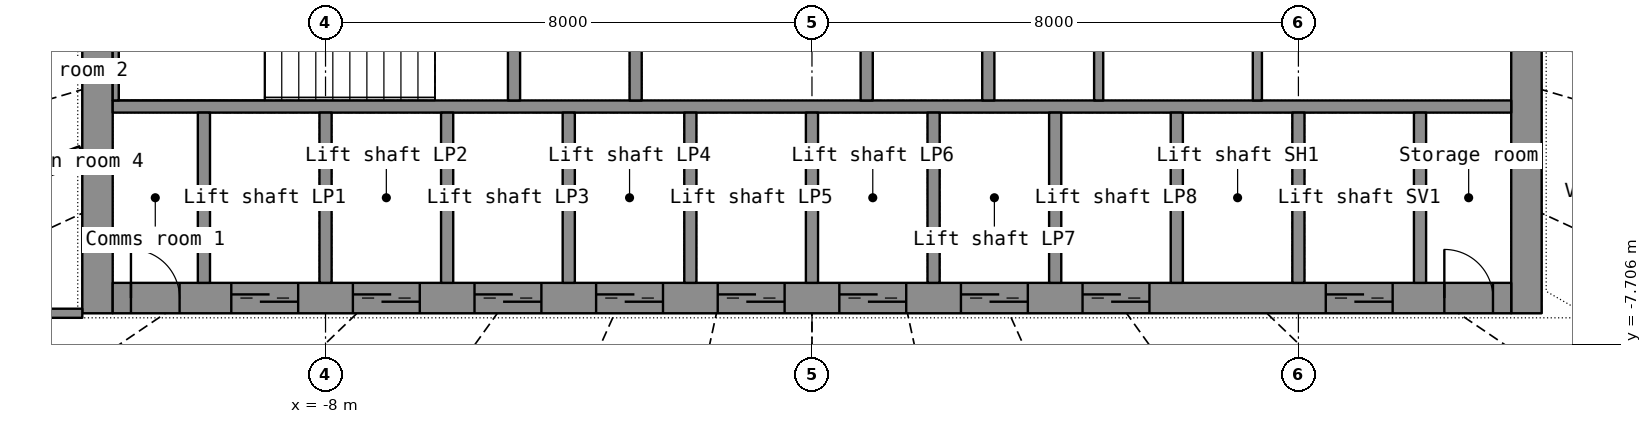
"""IFC4 building model, lengths in metres.
Left out: names, types, materials, properties, quantities, classifications, styles, units other than length and angle.
Written with IfcOpenShell. Run it as: python <this file> out.ifc"""

import sys

from ifc_helpers import new_model, si_unit, direction, frame, frame_2d, origin, place, context, subcontext, project, spatial, rectangle, extrude, element, fill, save


model = new_model("IFC4")
c1 = context("Model", 3, precision=1e-05, world=origin(), true_north=direction((0.0, 1.0)))
c2 = subcontext(c1, "Body", "Model", "MODEL_VIEW")
j1 = project(units=[si_unit("LENGTHUNIT", "METRE"), si_unit("PLANEANGLEUNIT", "RADIAN")], contexts=[c1])
p1 = place(None, origin())
s1 = spatial("IfcSite", under=j1, at=p1, CompositionType="ELEMENT")
p2 = place(p1, origin())
s2 = spatial("IfcBuilding", under=s1, at=p2, CompositionType="ELEMENT")
p3 = place(p2, frame((0.0, 0.0, 130.4)))
s3 = spatial("IfcBuildingStorey", under=s2, at=p3, CompositionType="ELEMENT", Elevation=130.4)
p4 = place(p3, frame((-11.75, -7.2, 0.0), z_axis=(0.0, 0.0, 1.0), x_axis=(0.0, 1.0, 0.0)))
e1 = element("IfcWall", 1, at=p4, inside=s3, PredefinedType="SHEAR", context=c2, shape_type="SweptSolid", body=[
    extrude(rectangle(XDim=14.4, YDim=0.5, at=frame_2d((7.2, 0.0))), origin(), (0.0, 0.0, 1.0), 3.3),
])
p5 = place(p4, frame((6.5, 0.0, 0.0)))
e2 = element("IfcOpeningElement", 2, at=p5, cuts=e1, PredefinedType="OPENING", context=c2, shape_type="SweptSolid", body=[
    extrude(rectangle(XDim=1.4, YDim=2.2, at=frame_2d((0.7, 1.1))), frame((0.0, 0.26, 0.0), z_axis=(0.0, -1.0, 0.0), x_axis=(1.0, 0.0, 0.0)), (0.0, 0.0, 1.0), 0.52),
])
p6 = place(p3, frame((11.75, -7.2, 0.0), z_axis=(0.0, 0.0, 1.0), x_axis=(0.0, 1.0, 0.0)))
e3 = element("IfcWall", 3, at=p6, inside=s3, PredefinedType="SHEAR", context=c2, shape_type="SweptSolid", body=[
    extrude(rectangle(XDim=14.4, YDim=0.5, at=frame_2d((7.2, 0.0))), origin(), (0.0, 0.0, 1.0), 3.3),
])
p7 = place(p6, frame((6.5, 0.0, 0.0)))
e4 = element("IfcOpeningElement", 4, at=p7, cuts=e3, PredefinedType="OPENING", context=c2, shape_type="SweptSolid", body=[
    extrude(rectangle(XDim=1.4, YDim=2.2, at=frame_2d((0.7, 1.1))), frame((0.0, 0.26, 0.0), z_axis=(0.0, -1.0, 0.0), x_axis=(1.0, 0.0, 0.0)), (0.0, 0.0, 1.0), 0.52),
])
p8 = place(p3, frame((-11.5, -6.95, 0.0), z_axis=(0.0, 0.0, 1.0), x_axis=(1.0, 0.0, 0.0)))
e5 = element("IfcWall", 5, at=p8, inside=s3, PredefinedType="SHEAR", context=c2, shape_type="SweptSolid", body=[
    extrude(rectangle(XDim=23.0, YDim=0.5, at=frame_2d((11.5, 0.0))), origin(), (0.0, 0.0, 1.0), 3.3),
])
p9 = place(p8, frame((1.95, 0.0, 0.0)))
e6 = element("IfcOpeningElement", 6, at=p9, cuts=e5, PredefinedType="OPENING", context=c2, shape_type="SweptSolid", body=[
    extrude(rectangle(XDim=1.1, YDim=2.2, at=frame_2d((0.55, 1.1))), frame((0.0, 0.26, 0.0), z_axis=(0.0, -1.0, 0.0), x_axis=(1.0, 0.0, 0.0)), (0.0, 0.0, 1.0), 0.52),
])
p10 = place(p8, frame((3.95, 0.0, 0.0)))
e7 = element("IfcOpeningElement", 7, at=p10, cuts=e5, PredefinedType="OPENING", context=c2, shape_type="SweptSolid", body=[
    extrude(rectangle(XDim=1.1, YDim=2.2, at=frame_2d((0.55, 1.1))), frame((0.0, 0.26, 0.0), z_axis=(0.0, -1.0, 0.0), x_axis=(1.0, 0.0, 0.0)), (0.0, 0.0, 1.0), 0.52),
])
p11 = place(p8, frame((5.95, 0.0, 0.0)))
e8 = element("IfcOpeningElement", 8, at=p11, cuts=e5, PredefinedType="OPENING", context=c2, shape_type="SweptSolid", body=[
    extrude(rectangle(XDim=1.1, YDim=2.2, at=frame_2d((0.55, 1.1))), frame((0.0, 0.26, 0.0), z_axis=(0.0, -1.0, 0.0), x_axis=(1.0, 0.0, 0.0)), (0.0, 0.0, 1.0), 0.52),
])
p12 = place(p8, frame((7.95, 0.0, 0.0)))
e9 = element("IfcOpeningElement", 9, at=p12, cuts=e5, PredefinedType="OPENING", context=c2, shape_type="SweptSolid", body=[
    extrude(rectangle(XDim=1.1, YDim=2.2, at=frame_2d((0.55, 1.1))), frame((0.0, 0.26, 0.0), z_axis=(0.0, -1.0, 0.0), x_axis=(1.0, 0.0, 0.0)), (0.0, 0.0, 1.0), 0.52),
])
p13 = place(p8, frame((9.95, 0.0, 0.0)))
e10 = element("IfcOpeningElement", 10, at=p13, cuts=e5, PredefinedType="OPENING", context=c2, shape_type="SweptSolid", body=[
    extrude(rectangle(XDim=1.1, YDim=2.2, at=frame_2d((0.55, 1.1))), frame((0.0, 0.26, 0.0), z_axis=(0.0, -1.0, 0.0), x_axis=(1.0, 0.0, 0.0)), (0.0, 0.0, 1.0), 0.52),
])
p14 = place(p8, frame((11.95, 0.0, 0.0)))
e11 = element("IfcOpeningElement", 11, at=p14, cuts=e5, PredefinedType="OPENING", context=c2, shape_type="SweptSolid", body=[
    extrude(rectangle(XDim=1.1, YDim=2.2, at=frame_2d((0.55, 1.1))), frame((0.0, 0.26, 0.0), z_axis=(0.0, -1.0, 0.0), x_axis=(1.0, 0.0, 0.0)), (0.0, 0.0, 1.0), 0.52),
])
p15 = place(p8, frame((13.95, 0.0, 0.0)))
e12 = element("IfcOpeningElement", 12, at=p15, cuts=e5, PredefinedType="OPENING", context=c2, shape_type="SweptSolid", body=[
    extrude(rectangle(XDim=1.1, YDim=2.2, at=frame_2d((0.55, 1.1))), frame((0.0, 0.26, 0.0), z_axis=(0.0, -1.0, 0.0), x_axis=(1.0, 0.0, 0.0)), (0.0, 0.0, 1.0), 0.52),
])
p16 = place(p8, frame((15.95, 0.0, 0.0)))
e13 = element("IfcOpeningElement", 13, at=p16, cuts=e5, PredefinedType="OPENING", context=c2, shape_type="SweptSolid", body=[
    extrude(rectangle(XDim=1.1, YDim=2.2, at=frame_2d((0.55, 1.1))), frame((0.0, 0.26, 0.0), z_axis=(0.0, -1.0, 0.0), x_axis=(1.0, 0.0, 0.0)), (0.0, 0.0, 1.0), 0.52),
])
p17 = place(p8, frame((19.95, 0.0, 0.0)))
e14 = element("IfcOpeningElement", 14, at=p17, cuts=e5, PredefinedType="OPENING", context=c2, shape_type="SweptSolid", body=[
    extrude(rectangle(XDim=1.1, YDim=2.2, at=frame_2d((0.55, 1.1))), frame((0.0, 0.26, 0.0), z_axis=(0.0, -1.0, 0.0), x_axis=(1.0, 0.0, 0.0)), (0.0, 0.0, 1.0), 0.52),
])
p18 = place(p8, frame((0.3, 0.0, 0.0)))
e15 = element("IfcOpeningElement", 15, at=p18, cuts=e5, PredefinedType="OPENING", context=c2, shape_type="SweptSolid", body=[
    extrude(rectangle(XDim=0.8, YDim=2.05, at=frame_2d((0.4, 1.025))), frame((0.0, 0.26, 0.0), z_axis=(0.0, -1.0, 0.0), x_axis=(1.0, 0.0, 0.0)), (0.0, 0.0, 1.0), 0.52),
])
p19 = place(p8, frame((21.9, 0.0, 0.0)))
e16 = element("IfcOpeningElement", 16, at=p19, cuts=e5, PredefinedType="OPENING", context=c2, shape_type="SweptSolid", body=[
    extrude(rectangle(XDim=0.8, YDim=2.05, at=frame_2d((0.4, 1.025))), frame((0.0, 0.26, 0.0), z_axis=(0.0, -1.0, 0.0), x_axis=(1.0, 0.0, 0.0)), (0.0, 0.0, 1.0), 0.52),
])
p20 = place(p3, frame((-11.5, -3.8, 0.0), z_axis=(0.0, 0.0, 1.0), x_axis=(1.0, 0.0, 0.0)))
e17 = element("IfcWall", 17, at=p20, inside=s3, PredefinedType="SHEAR", context=c2, shape_type="SweptSolid", body=[
    extrude(rectangle(XDim=23.0, YDim=0.2, at=frame_2d((11.5, 0.0))), origin(), (0.0, 0.0, 1.0), 3.3),
])
for number, where, z_axis, x_axis in (
    (18, (-10.0, -6.7, 0.0), (0.0, 0.0, 1.0), (0.0, 1.0, 0.0)),
    (19, (-8.0, -6.7, 0.0), (0.0, 0.0, 1.0), (0.0, 1.0, 0.0)),
    (20, (-6.0, -6.7, 0.0), (0.0, 0.0, 1.0), (0.0, 1.0, 0.0)),
    (21, (-4.0, -6.7, 0.0), (0.0, 0.0, 1.0), (0.0, 1.0, 0.0)),
    (22, (-2.0, -6.7, 0.0), (0.0, 0.0, 1.0), (0.0, 1.0, 0.0)),
    (23, (0.0, -6.7, 0.0), (0.0, 0.0, 1.0), (0.0, 1.0, 0.0)),
    (24, (2.0, -6.7, 0.0), (0.0, 0.0, 1.0), (0.0, 1.0, 0.0)),
    (25, (4.0, -6.7, 0.0), (0.0, 0.0, 1.0), (0.0, 1.0, 0.0)),
    (26, (6.0, -6.7, 0.0), (0.0, 0.0, 1.0), (0.0, 1.0, 0.0)),
    (27, (8.0, -6.7, 0.0), (0.0, 0.0, 1.0), (0.0, 1.0, 0.0)),
    (28, (10.0, -6.7, 0.0), (0.0, 0.0, 1.0), (0.0, 1.0, 0.0)),
):
    element("IfcWall", number, at=place(p3, frame(where, z_axis=z_axis, x_axis=x_axis)), inside=s3, PredefinedType="SHEAR", context=c2, shape_type="SweptSolid", body=[
        extrude(rectangle(XDim=2.8, YDim=0.2, at=frame_2d((1.4, 0.0))), origin(), (0.0, 0.0, 1.0), 3.3),
    ])
p21 = place(p3, frame((-2.9, -3.7, 0.0), z_axis=(0.0, 0.0, 1.0), x_axis=(0.0, 1.0, 0.0)))
e29 = element("IfcWall", 29, at=p21, inside=s3, PredefinedType="SHEAR", context=c2, shape_type="SweptSolid", body=[
    extrude(rectangle(XDim=7.4, YDim=0.2, at=frame_2d((3.7, 0.0))), origin(), (0.0, 0.0, 1.0), 3.3),
])
p22 = place(p21, frame((3.1, 0.0, 0.0)))
e30 = element("IfcOpeningElement", 30, at=p22, cuts=e29, PredefinedType="OPENING", context=c2, shape_type="SweptSolid", body=[
    extrude(rectangle(XDim=1.2, YDim=2.2, at=frame_2d((0.6, 1.1))), frame((0.0, 0.11, 0.0), z_axis=(0.0, -1.0, 0.0), x_axis=(1.0, 0.0, 0.0)), (0.0, 0.0, 1.0), 0.22),
])
p23 = place(p3, frame((2.9, -3.7, 0.0), z_axis=(0.0, 0.0, 1.0), x_axis=(0.0, 1.0, 0.0)))
e31 = element("IfcWall", 31, at=p23, inside=s3, PredefinedType="SHEAR", context=c2, shape_type="SweptSolid", body=[
    extrude(rectangle(XDim=7.4, YDim=0.2, at=frame_2d((3.7, 0.0))), origin(), (0.0, 0.0, 1.0), 3.3),
])
p24 = place(p23, frame((3.1, 0.0, 0.0)))
e32 = element("IfcOpeningElement", 32, at=p24, cuts=e31, PredefinedType="OPENING", context=c2, shape_type="SweptSolid", body=[
    extrude(rectangle(XDim=1.2, YDim=2.2, at=frame_2d((0.6, 1.1))), frame((0.0, 0.11, 0.0), z_axis=(0.0, -1.0, 0.0), x_axis=(1.0, 0.0, 0.0)), (0.0, 0.0, 1.0), 0.22),
])
p25 = place(p3, frame((0.9, -3.7, 0.0), z_axis=(0.0, 0.0, 1.0), x_axis=(0.0, 1.0, 0.0)))
e33 = element("IfcWall", 33, at=p25, inside=s3, PredefinedType="SHEAR", context=c2, shape_type="SweptSolid", body=[
    extrude(rectangle(XDim=2.35, YDim=0.2, at=frame_2d((1.175, 0.0))), origin(), (0.0, 0.0, 1.0), 3.3),
])
p26 = place(p3, frame((-11.45, -3.7, 0.0), z_axis=(0.0, 0.0, 1.0), x_axis=(0.0, 1.0, 0.0)))
e34 = element("IfcWall", 34, at=p26, inside=s3, PredefinedType="SHEAR", context=c2, shape_type="SweptSolid", body=[
    extrude(rectangle(XDim=2.35, YDim=0.1, at=frame_2d((1.175, 0.0))), origin(), (0.0, 0.0, 1.0), 3.3),
])
p27 = place(p3, frame((-4.9, -3.7, 0.0), z_axis=(0.0, 0.0, 1.0), x_axis=(0.0, 1.0, 0.0)))
e35 = element("IfcWall", 35, at=p27, inside=s3, PredefinedType="SHEAR", context=c2, shape_type="SweptSolid", body=[
    extrude(rectangle(XDim=2.35, YDim=0.2, at=frame_2d((1.175, 0.0))), origin(), (0.0, 0.0, 1.0), 3.3),
])
for number, where, z_axis, x_axis in (
    (36, (4.715, -3.7, 0.0), (0.0, 0.0, 1.0), (0.0, 1.0, 0.0)),
    (37, (7.325, -3.7, 0.0), (0.0, 0.0, 1.0), (0.0, 1.0, 0.0)),
):
    element("IfcWall", number, at=place(p3, frame(where, z_axis=z_axis, x_axis=x_axis)), inside=s3, PredefinedType="PARTITIONING", context=c2, shape_type="SweptSolid", body=[
        extrude(rectangle(XDim=2.35, YDim=0.15, at=frame_2d((1.175, 0.0))), origin(), (0.0, 0.0, 1.0), 3.3),
    ])
p28 = place(p3, frame((-15.873, -6.063, 0.0), z_axis=(0.0, 0.0, 1.0), x_axis=(0.934170215, 0.356827703, 0.0)))
e38 = element("IfcWall", 38, at=p28, inside=s3, PredefinedType="PARTITIONING", context=c2, shape_type="SweptSolid", body=[
    extrude(rectangle(XDim=4.146, YDim=0.28, at=frame_2d((2.073, 0.0))), origin(), (0.0, 0.0, 1.0), 2.4),
])
p29 = place(p28, frame((1.323, 0.0, 1.0)))
e39 = element("IfcOpeningElement", 39, at=p29, cuts=e38, PredefinedType="OPENING", context=c2, shape_type="SweptSolid", body=[
    extrude(rectangle(XDim=1.5, YDim=1.2, at=frame_2d((0.75, 0.6))), frame((0.0, 0.15, 0.0), z_axis=(0.0, -1.0, 0.0), x_axis=(1.0, 0.0, 0.0)), (0.0, 0.0, 1.0), 0.3),
])
p30 = place(p3, frame((16.0, -3.512, 0.0), z_axis=(0.0, 0.0, 1.0), x_axis=(-0.976750433, 0.214379551, 0.0)))
e40 = element("IfcWall", 40, at=p30, inside=s3, PredefinedType="PARTITIONING", context=c2, shape_type="SweptSolid", body=[
    extrude(rectangle(XDim=4.095, YDim=0.28, at=frame_2d((2.048, 0.0))), origin(), (0.0, 0.0, 1.0), 2.4),
])
p31 = place(p30, frame((1.298, 0.0, 1.0)))
e41 = element("IfcOpeningElement", 41, at=p31, cuts=e40, PredefinedType="OPENING", context=c2, shape_type="SweptSolid", body=[
    extrude(rectangle(XDim=1.5, YDim=1.2, at=frame_2d((0.75, 0.6))), frame((0.0, 0.15, 0.0), z_axis=(0.0, -1.0, 0.0), x_axis=(1.0, 0.0, 0.0)), (0.0, 0.0, 1.0), 0.3),
])
p32 = place(p3, frame((-12.0, -7.2, 0.0), z_axis=(0.0, 0.0, 1.0), x_axis=(-1.0, 0.0, 0.0)))
e42 = element("IfcWall", 42, at=p32, inside=s3, PredefinedType="PARTITIONING", context=c2, shape_type="SweptSolid", body=[
    extrude(rectangle(XDim=4.0, YDim=0.15, at=frame_2d((2.0, 0.0))), origin(), (0.0, 0.0, 1.0), 2.4),
])
p33 = place(p32, frame((1.5, 0.0, 0.0)))
e43 = element("IfcOpeningElement", 43, at=p33, cuts=e42, PredefinedType="OPENING", context=c2, shape_type="SweptSolid", body=[
    extrude(rectangle(XDim=1.0, YDim=2.2, at=frame_2d((0.5, 1.1))), frame((0.0, 0.085, 0.0), z_axis=(0.0, -1.0, 0.0), x_axis=(1.0, 0.0, 0.0)), (0.0, 0.0, 1.0), 0.17),
])
p34 = place(p9, origin())
e44 = element("IfcDoor", 44, at=p34, inside=s3, OperationType="DOUBLE_DOOR_SLIDING", PredefinedType="DOOR", context=c2, shape_type="SweptSolid", body=[
    extrude(rectangle(XDim=1.1, YDim=2.2, at=frame_2d((0.55, 1.1))), frame((0.0, 0.025, 0.0), z_axis=(0.0, -1.0, 0.0), x_axis=(1.0, 0.0, 0.0)), (0.0, 0.0, 1.0), 0.05),
])
fill(e6, e44)
p35 = place(p10, origin())
e45 = element("IfcDoor", 45, at=p35, inside=s3, OperationType="DOUBLE_DOOR_SLIDING", PredefinedType="DOOR", context=c2, shape_type="SweptSolid", body=[
    extrude(rectangle(XDim=1.1, YDim=2.2, at=frame_2d((0.55, 1.1))), frame((0.0, 0.025, 0.0), z_axis=(0.0, -1.0, 0.0), x_axis=(1.0, 0.0, 0.0)), (0.0, 0.0, 1.0), 0.05),
])
fill(e7, e45)
p36 = place(p11, origin())
e46 = element("IfcDoor", 46, at=p36, inside=s3, OperationType="DOUBLE_DOOR_SLIDING", PredefinedType="DOOR", context=c2, shape_type="SweptSolid", body=[
    extrude(rectangle(XDim=1.1, YDim=2.2, at=frame_2d((0.55, 1.1))), frame((0.0, 0.025, 0.0), z_axis=(0.0, -1.0, 0.0), x_axis=(1.0, 0.0, 0.0)), (0.0, 0.0, 1.0), 0.05),
])
fill(e8, e46)
p37 = place(p12, origin())
e47 = element("IfcDoor", 47, at=p37, inside=s3, OperationType="DOUBLE_DOOR_SLIDING", PredefinedType="DOOR", context=c2, shape_type="SweptSolid", body=[
    extrude(rectangle(XDim=1.1, YDim=2.2, at=frame_2d((0.55, 1.1))), frame((0.0, 0.025, 0.0), z_axis=(0.0, -1.0, 0.0), x_axis=(1.0, 0.0, 0.0)), (0.0, 0.0, 1.0), 0.05),
])
fill(e9, e47)
p38 = place(p13, origin())
e48 = element("IfcDoor", 48, at=p38, inside=s3, OperationType="DOUBLE_DOOR_SLIDING", PredefinedType="DOOR", context=c2, shape_type="SweptSolid", body=[
    extrude(rectangle(XDim=1.1, YDim=2.2, at=frame_2d((0.55, 1.1))), frame((0.0, 0.025, 0.0), z_axis=(0.0, -1.0, 0.0), x_axis=(1.0, 0.0, 0.0)), (0.0, 0.0, 1.0), 0.05),
])
fill(e10, e48)
p39 = place(p14, origin())
e49 = element("IfcDoor", 49, at=p39, inside=s3, OperationType="DOUBLE_DOOR_SLIDING", PredefinedType="DOOR", context=c2, shape_type="SweptSolid", body=[
    extrude(rectangle(XDim=1.1, YDim=2.2, at=frame_2d((0.55, 1.1))), frame((0.0, 0.025, 0.0), z_axis=(0.0, -1.0, 0.0), x_axis=(1.0, 0.0, 0.0)), (0.0, 0.0, 1.0), 0.05),
])
fill(e11, e49)
p40 = place(p15, origin())
e50 = element("IfcDoor", 50, at=p40, inside=s3, OperationType="DOUBLE_DOOR_SLIDING", PredefinedType="DOOR", context=c2, shape_type="SweptSolid", body=[
    extrude(rectangle(XDim=1.1, YDim=2.2, at=frame_2d((0.55, 1.1))), frame((0.0, 0.025, 0.0), z_axis=(0.0, -1.0, 0.0), x_axis=(1.0, 0.0, 0.0)), (0.0, 0.0, 1.0), 0.05),
])
fill(e12, e50)
p41 = place(p16, origin())
e51 = element("IfcDoor", 51, at=p41, inside=s3, OperationType="DOUBLE_DOOR_SLIDING", PredefinedType="DOOR", context=c2, shape_type="SweptSolid", body=[
    extrude(rectangle(XDim=1.1, YDim=2.2, at=frame_2d((0.55, 1.1))), frame((0.0, 0.025, 0.0), z_axis=(0.0, -1.0, 0.0), x_axis=(1.0, 0.0, 0.0)), (0.0, 0.0, 1.0), 0.05),
])
fill(e13, e51)
p42 = place(p17, origin())
e52 = element("IfcDoor", 52, at=p42, inside=s3, OperationType="DOUBLE_DOOR_SLIDING", PredefinedType="DOOR", context=c2, shape_type="SweptSolid", body=[
    extrude(rectangle(XDim=1.1, YDim=2.2, at=frame_2d((0.55, 1.1))), frame((0.0, 0.025, 0.0), z_axis=(0.0, -1.0, 0.0), x_axis=(1.0, 0.0, 0.0)), (0.0, 0.0, 1.0), 0.05),
])
fill(e14, e52)
p43 = place(p18, origin())
e53 = element("IfcDoor", 53, at=p43, inside=s3, OperationType="SINGLE_SWING_LEFT", PredefinedType="DOOR", context=c2, shape_type="SweptSolid", body=[
    extrude(rectangle(XDim=0.8, YDim=2.05, at=frame_2d((0.4, 1.025))), frame((0.0, 0.025, 0.0), z_axis=(0.0, -1.0, 0.0), x_axis=(1.0, 0.0, 0.0)), (0.0, 0.0, 1.0), 0.05),
])
fill(e15, e53)
p44 = place(p19, origin())
e54 = element("IfcDoor", 54, at=p44, inside=s3, OperationType="SINGLE_SWING_LEFT", PredefinedType="DOOR", context=c2, shape_type="SweptSolid", body=[
    extrude(rectangle(XDim=0.8, YDim=2.05, at=frame_2d((0.4, 1.025))), frame((0.0, 0.025, 0.0), z_axis=(0.0, -1.0, 0.0), x_axis=(1.0, 0.0, 0.0)), (0.0, 0.0, 1.0), 0.05),
])
fill(e16, e54)
save(model, sys.argv[1])
